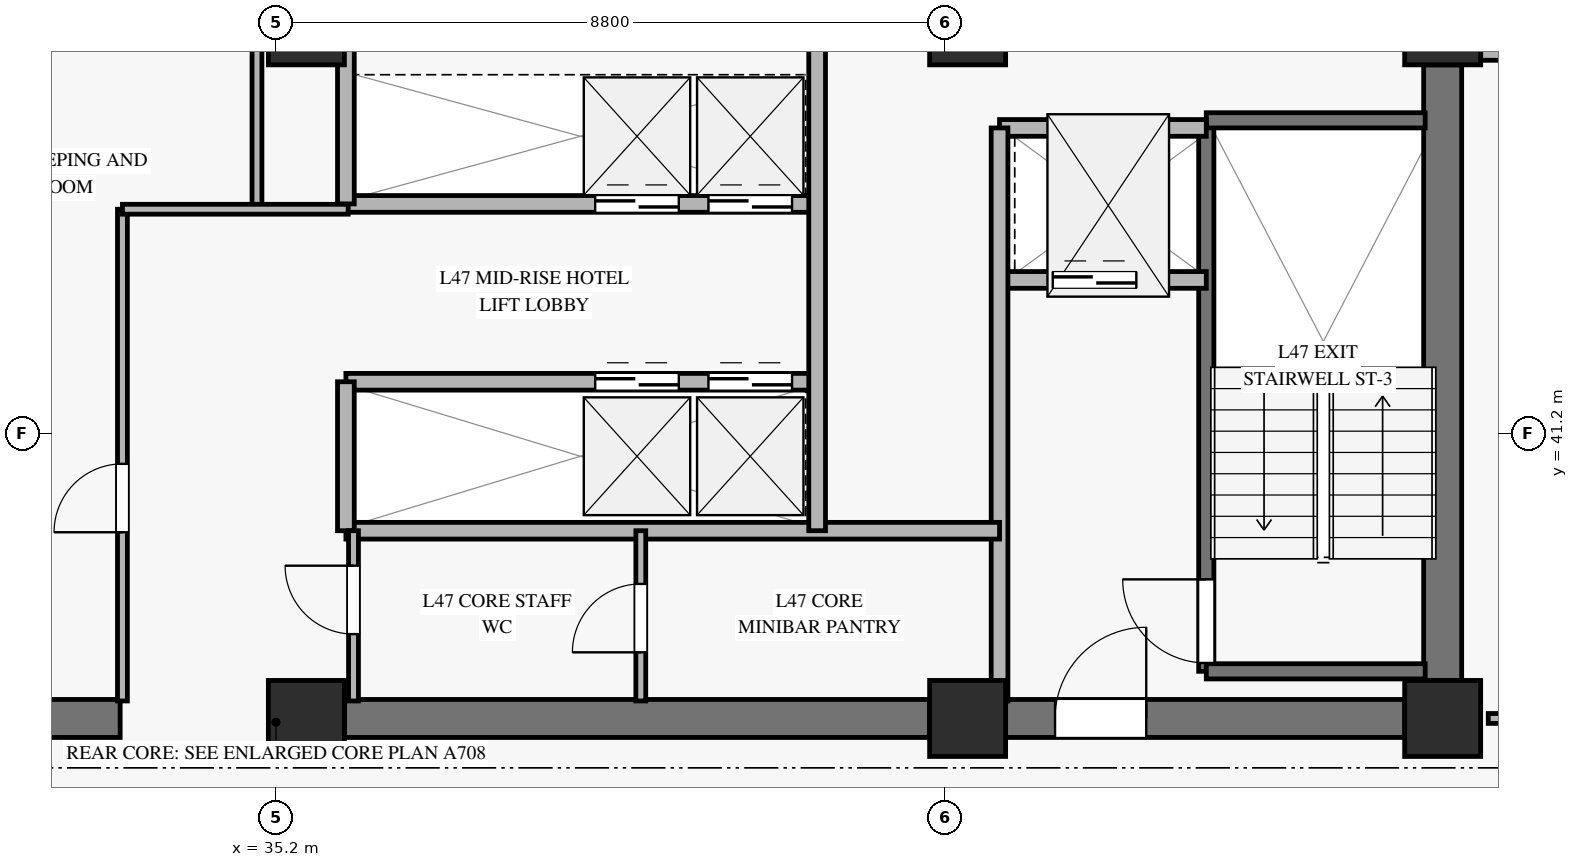
"""IFC4 building model, lengths in metres.
Left out: names, types, materials, properties, quantities, classifications, styles, units other than length and angle.
Written with IfcOpenShell. Run it as: python <this file> out.ifc"""

import sys

from ifc_helpers import new_model, si_unit, direction, frame, frame_2d, origin, origin_2d, place, context, subcontext, project, spatial, rectangle, extrude, source, transform, mapped, element, fill, save


model = new_model("IFC4")
c1 = context("Model", 3, precision=1e-05, world=origin(), true_north=direction((0.0, 1.0)))
c2 = subcontext(c1, "Body", "Model", "MODEL_VIEW")
j1 = project(units=[si_unit("LENGTHUNIT", "METRE"), si_unit("PLANEANGLEUNIT", "RADIAN")], contexts=[c1])
p1 = place(None, origin())
s1 = spatial("IfcSite", under=j1, at=p1, CompositionType="ELEMENT")
p2 = place(p1, origin())
s2 = spatial("IfcBuilding", under=s1, at=p2, CompositionType="ELEMENT")
p3 = place(p2, frame((0.0, 0.0, 187.7)))
s3 = spatial("IfcBuildingStorey", under=s2, at=p3, CompositionType="ELEMENT", Elevation=187.7)
m1 = source(origin(), c2, "Body", "SweptSolid", [
    extrude(rectangle(XDim=1.0, YDim=1.0, at=origin_2d()), origin(), (0.0, 0.0, 1.0), 3.22),
])
for number, where, z_axis, x_axis in (
    (1, (35.6, 37.45, 0.0), (0.0, 0.0, 1.0), (1.0, 0.0, 0.0)),
    (2, (35.6, 46.55, 0.0), (0.0, 0.0, 1.0), (1.0, 0.0, 0.0)),
    (3, (44.3, 37.45, 0.0), (0.0, 0.0, 1.0), (1.0, 0.0, 0.0)),
    (4, (44.3, 46.55, 0.0), (0.0, 0.0, 1.0), (1.0, 0.0, 0.0)),
    (5, (50.55, 37.45, 0.0), (0.0, 0.0, 1.0), (1.0, 0.0, 0.0)),
    (6, (50.55, 46.55, 0.0), (0.0, 0.0, 1.0), (1.0, 0.0, 0.0)),
):
    element("IfcColumn", number, at=place(p3, frame(where, z_axis=z_axis, x_axis=x_axis)), inside=s3, PredefinedType="PILASTER", context=c2, shape_type="MappedRepresentation", body=[
        mapped(m1, transform((0.0, 0.0, 0.0), x_axis=(1.0, 0.0, 0.0), y_axis=(0.0, 1.0, 0.0), z_axis=(0.0, 0.0, 1.0), scale=1.0)),
    ])
p4 = place(p3, frame((31.3, 37.45, 0.0), z_axis=(0.0, 0.0, 1.0), x_axis=(1.0, 0.0, 0.0)))
e7 = element("IfcWall", 7, at=p4, inside=s3, PredefinedType="SHEAR", context=c2, shape_type="SweptSolid", body=[
    extrude(rectangle(XDim=1.85, YDim=0.5, at=frame_2d((0.925, 0.0))), origin(), (0.0, 0.0, 1.0), 3.22),
])
p5 = place(p3, frame((36.1, 37.45, 0.0), z_axis=(0.0, 0.0, 1.0), x_axis=(1.0, 0.0, 0.0)))
e8 = element("IfcWall", 8, at=p5, inside=s3, PredefinedType="SHEAR", context=c2, shape_type="SweptSolid", body=[
    extrude(rectangle(XDim=7.7, YDim=0.5, at=frame_2d((3.85, 0.0))), origin(), (0.0, 0.0, 1.0), 3.22),
])
p6 = place(p3, frame((44.8, 37.45, 0.0), z_axis=(0.0, 0.0, 1.0), x_axis=(1.0, 0.0, 0.0)))
e9 = element("IfcWall", 9, at=p6, inside=s3, PredefinedType="SHEAR", context=c2, shape_type="SweptSolid", body=[
    extrude(rectangle(XDim=5.25, YDim=0.5, at=frame_2d((2.625, 0.0))), origin(), (0.0, 0.0, 1.0), 3.22),
])
p7 = place(p6, frame((0.65, 0.0, 0.0)))
e10 = element("IfcOpeningElement", 10, at=p7, cuts=e9, PredefinedType="OPENING", context=c2, shape_type="SweptSolid", body=[
    extrude(rectangle(XDim=1.2, YDim=2.15, at=frame_2d((0.6, 1.075))), frame((0.0, 0.26, 0.0), z_axis=(0.0, -1.0, 0.0), x_axis=(1.0, 0.0, 0.0)), (0.0, 0.0, 1.0), 0.52),
])
p8 = place(p3, frame((50.55, 37.95, 0.0), z_axis=(0.0, 0.0, 1.0), x_axis=(0.0, 1.0, 0.0)))
e11 = element("IfcWall", 11, at=p8, inside=s3, PredefinedType="SHEAR", context=c2, shape_type="SweptSolid", body=[
    extrude(rectangle(XDim=8.1, YDim=0.5, at=frame_2d((4.05, 0.0))), origin(), (0.0, 0.0, 1.0), 3.22),
])
p9 = place(p3, frame((51.05, 46.25, 0.0), z_axis=(0.0, 0.0, 1.0), x_axis=(1.0, 0.0, 0.0)))
e12 = element("IfcWall", 12, at=p9, inside=s3, PredefinedType="SOLIDWALL", context=c2, shape_type="SweptSolid", body=[
    extrude(rectangle(XDim=9.986, YDim=0.28, at=frame_2d((4.993, 0.0))), origin(), (0.0, 0.0, 1.0), 2.7),
])
p10 = place(p9, frame((4.193, 0.0, 0.45)))
e13 = element("IfcOpeningElement", 13, at=p10, cuts=e12, PredefinedType="OPENING", context=c2, shape_type="SweptSolid", body=[
    extrude(rectangle(XDim=1.6, YDim=2.0, at=frame_2d((0.8, 1.0))), frame((0.0, 0.15, 0.0), z_axis=(0.0, -1.0, 0.0), x_axis=(1.0, 0.0, 0.0)), (0.0, 0.0, 1.0), 0.3),
])
p11 = place(p3, frame((47.44, 38.07, 0.0), z_axis=(0.0, 0.0, 1.0), x_axis=(0.0, 1.0, 0.0)))
e14 = element("IfcWall", 14, at=p11, inside=s3, PredefinedType="SOLIDWALL", context=c2, shape_type="SweptSolid", body=[
    extrude(rectangle(XDim=7.25, YDim=0.2, at=frame_2d((3.625, 0.0))), origin(), (0.0, 0.0, 1.0), 3.5),
])
p12 = place(p11, frame((0.11, 0.0, 0.0)))
e15 = element("IfcOpeningElement", 15, at=p12, cuts=e14, PredefinedType="OPENING", context=c2, shape_type="SweptSolid", body=[
    extrude(rectangle(XDim=1.1, YDim=2.15, at=frame_2d((0.55, 1.075))), frame((0.0, 0.11, 0.0), z_axis=(0.0, -1.0, 0.0), x_axis=(1.0, 0.0, 0.0)), (0.0, 0.0, 1.0), 0.22),
])
for number, where, z_axis, x_axis in (
    (16, (47.44, 45.32, 0.0), (0.0, 0.0, 1.0), (1.0, 0.0, 0.0)),
    (17, (47.44, 38.07, 0.0), (0.0, 0.0, 1.0), (1.0, 0.0, 0.0)),
):
    element("IfcWall", number, at=place(p3, frame(where, z_axis=z_axis, x_axis=x_axis)), inside=s3, PredefinedType="SOLIDWALL", context=c2, shape_type="SweptSolid", body=[
        extrude(rectangle(XDim=2.88, YDim=0.2, at=frame_2d((1.44, 0.0))), origin(), (0.0, 0.0, 1.0), 3.5),
    ])
p13 = place(p3, frame((44.72, 43.22, 0.0), z_axis=(0.0, 0.0, 1.0), x_axis=(1.0, 0.0, 0.0)))
e18 = element("IfcWall", 18, at=p13, inside=s3, PredefinedType="SOLIDWALL", context=c2, shape_type="SweptSolid", body=[
    extrude(rectangle(XDim=2.72, YDim=0.22, at=frame_2d((1.36, 0.0))), origin(), (0.0, 0.0, 1.0), 3.22),
])
p14 = place(p13, frame((0.7, 0.0, 0.0)))
e19 = element("IfcOpeningElement", 19, at=p14, cuts=e18, PredefinedType="OPENING", context=c2, shape_type="SweptSolid", body=[
    extrude(rectangle(XDim=1.1, YDim=2.2, at=frame_2d((0.55, 1.1))), frame((0.0, 0.12, 0.0), z_axis=(0.0, -1.0, 0.0), x_axis=(1.0, 0.0, 0.0)), (0.0, 0.0, 1.0), 0.24),
])
p15 = place(p3, frame((44.72, 45.22, 0.0), z_axis=(0.0, 0.0, 1.0), x_axis=(1.0, 0.0, 0.0)))
e20 = element("IfcWall", 20, at=p15, inside=s3, PredefinedType="SOLIDWALL", context=c2, shape_type="SweptSolid", body=[
    extrude(rectangle(XDim=2.72, YDim=0.22, at=frame_2d((1.36, 0.0))), origin(), (0.0, 0.0, 1.0), 3.22),
])
p16 = place(p3, frame((44.72, 37.68, 0.0), z_axis=(0.0, 0.0, 1.0), x_axis=(0.0, 1.0, 0.0)))
e21 = element("IfcWall", 21, at=p16, inside=s3, PredefinedType="SOLIDWALL", context=c2, shape_type="SweptSolid", body=[
    extrude(rectangle(XDim=7.54, YDim=0.22, at=frame_2d((3.77, 0.0))), origin(), (0.0, 0.0, 1.0), 3.22),
])
p17 = place(p3, frame((36.12, 44.22, 0.0), z_axis=(0.0, 0.0, 1.0), x_axis=(1.0, 0.0, 0.0)))
e22 = element("IfcWall", 22, at=p17, inside=s3, PredefinedType="SOLIDWALL", context=c2, shape_type="SweptSolid", body=[
    extrude(rectangle(XDim=6.2, YDim=0.22, at=frame_2d((3.1, 0.0))), origin(), (0.0, 0.0, 1.0), 3.22),
])
p18 = place(p17, frame((3.28, 0.0, 0.0)))
e23 = element("IfcOpeningElement", 23, at=p18, cuts=e22, PredefinedType="OPENING", context=c2, shape_type="SweptSolid", body=[
    extrude(rectangle(XDim=1.1, YDim=2.2, at=frame_2d((0.55, 1.1))), frame((0.0, 0.12, 0.0), z_axis=(0.0, -1.0, 0.0), x_axis=(1.0, 0.0, 0.0)), (0.0, 0.0, 1.0), 0.24),
])
p19 = place(p17, frame((4.77, 0.0, 0.0)))
e24 = element("IfcOpeningElement", 24, at=p19, cuts=e22, PredefinedType="OPENING", context=c2, shape_type="SweptSolid", body=[
    extrude(rectangle(XDim=1.1, YDim=2.2, at=frame_2d((0.55, 1.1))), frame((0.0, 0.12, 0.0), z_axis=(0.0, -1.0, 0.0), x_axis=(1.0, 0.0, 0.0)), (0.0, 0.0, 1.0), 0.24),
])
p20 = place(p3, frame((36.12, 41.88, 0.0), z_axis=(0.0, 0.0, 1.0), x_axis=(1.0, 0.0, 0.0)))
e25 = element("IfcWall", 25, at=p20, inside=s3, PredefinedType="SOLIDWALL", context=c2, shape_type="SweptSolid", body=[
    extrude(rectangle(XDim=6.2, YDim=0.22, at=frame_2d((3.1, 0.0))), origin(), (0.0, 0.0, 1.0), 3.22),
])
p21 = place(p20, frame((3.28, 0.0, 0.0)))
e26 = element("IfcOpeningElement", 26, at=p21, cuts=e25, PredefinedType="OPENING", context=c2, shape_type="SweptSolid", body=[
    extrude(rectangle(XDim=1.1, YDim=2.2, at=frame_2d((0.55, 1.1))), frame((0.0, 0.12, 0.0), z_axis=(0.0, -1.0, 0.0), x_axis=(1.0, 0.0, 0.0)), (0.0, 0.0, 1.0), 0.24),
])
p22 = place(p20, frame((4.77, 0.0, 0.0)))
e27 = element("IfcOpeningElement", 27, at=p22, cuts=e25, PredefinedType="OPENING", context=c2, shape_type="SweptSolid", body=[
    extrude(rectangle(XDim=1.1, YDim=2.2, at=frame_2d((0.55, 1.1))), frame((0.0, 0.12, 0.0), z_axis=(0.0, -1.0, 0.0), x_axis=(1.0, 0.0, 0.0)), (0.0, 0.0, 1.0), 0.24),
])
p23 = place(p3, frame((36.12, 39.92, 0.0), z_axis=(0.0, 0.0, 1.0), x_axis=(1.0, 0.0, 0.0)))
e28 = element("IfcWall", 28, at=p23, inside=s3, PredefinedType="SOLIDWALL", context=c2, shape_type="SweptSolid", body=[
    extrude(rectangle(XDim=8.6, YDim=0.22, at=frame_2d((4.3, 0.0))), origin(), (0.0, 0.0, 1.0), 2.505),
])
p24 = place(p3, frame((42.32, 39.92, 0.0), z_axis=(0.0, 0.0, 1.0), x_axis=(0.0, 1.0, 0.0)))
e29 = element("IfcWall", 29, at=p24, inside=s3, PredefinedType="SOLIDWALL", context=c2, shape_type="SweptSolid", body=[
    extrude(rectangle(XDim=6.4, YDim=0.22, at=frame_2d((3.2, 0.0))), origin(), (0.0, 0.0, 1.0), 3.22),
])
p25 = place(p3, frame((36.12, 39.92, 0.0), z_axis=(0.0, 0.0, 1.0), x_axis=(0.0, 1.0, 0.0)))
e30 = element("IfcWall", 30, at=p25, inside=s3, PredefinedType="SOLIDWALL", context=c2, shape_type="SweptSolid", body=[
    extrude(rectangle(XDim=1.96, YDim=0.22, at=frame_2d((0.98, 0.0))), origin(), (0.0, 0.0, 1.0), 3.22),
])
p26 = place(p3, frame((36.12, 44.22, 0.0), z_axis=(0.0, 0.0, 1.0), x_axis=(0.0, 1.0, 0.0)))
e31 = element("IfcWall", 31, at=p26, inside=s3, PredefinedType="SOLIDWALL", context=c2, shape_type="SweptSolid", body=[
    extrude(rectangle(XDim=2.1, YDim=0.22, at=frame_2d((1.05, 0.0))), origin(), (0.0, 0.0, 1.0), 3.22),
])
p27 = place(p3, frame((33.18, 37.68, 0.0), z_axis=(0.0, 0.0, 1.0), x_axis=(0.0, 1.0, 0.0)))
e32 = element("IfcWall", 32, at=p27, inside=s3, PredefinedType="PARTITIONING", context=c2, shape_type="SweptSolid", body=[
    extrude(rectangle(XDim=6.47, YDim=0.13, at=frame_2d((3.235, 0.0))), origin(), (0.0, 0.0, 1.0), 2.305),
])
p28 = place(p27, frame((2.22, 0.0, 0.0)))
e33 = element("IfcOpeningElement", 33, at=p28, cuts=e32, PredefinedType="OPENING", context=c2, shape_type="SweptSolid", body=[
    extrude(rectangle(XDim=0.9, YDim=2.1, at=frame_2d((0.45, 1.05))), frame((0.0, 0.075, 0.0), z_axis=(0.0, -1.0, 0.0), x_axis=(1.0, 0.0, 0.0)), (0.0, 0.0, 1.0), 0.15),
])
p29 = place(p3, frame((34.95, 44.15, 0.0), z_axis=(0.0, 0.0, 1.0), x_axis=(0.0, 1.0, 0.0)))
e34 = element("IfcWall", 34, at=p29, inside=s3, PredefinedType="PARTITIONING", context=c2, shape_type="SweptSolid", body=[
    extrude(rectangle(XDim=2.17, YDim=0.13, at=frame_2d((1.085, 0.0))), origin(), (0.0, 0.0, 1.0), 3.22),
])
p30 = place(p3, frame((33.18, 44.15, 0.0), z_axis=(0.0, 0.0, 1.0), x_axis=(1.0, 0.0, 0.0)))
e35 = element("IfcWall", 35, at=p30, inside=s3, PredefinedType="PARTITIONING", context=c2, shape_type="SweptSolid", body=[
    extrude(rectangle(XDim=2.97, YDim=0.13, at=frame_2d((1.485, 0.0))), origin(), (0.0, 0.0, 1.0), 2.505),
])
p31 = place(p3, frame((36.22, 37.68, 0.0), z_axis=(0.0, 0.0, 1.0), x_axis=(0.0, 1.0, 0.0)))
e36 = element("IfcWall", 36, at=p31, inside=s3, PredefinedType="PARTITIONING", context=c2, shape_type="SweptSolid", body=[
    extrude(rectangle(XDim=2.24, YDim=0.13, at=frame_2d((1.12, 0.0))), origin(), (0.0, 0.0, 1.0), 3.22),
])
p32 = place(p31, frame((0.88, 0.0, 0.0)))
e37 = element("IfcOpeningElement", 37, at=p32, cuts=e36, PredefinedType="OPENING", context=c2, shape_type="SweptSolid", body=[
    extrude(rectangle(XDim=0.9, YDim=2.1, at=frame_2d((0.45, 1.05))), frame((0.0, 0.075, 0.0), z_axis=(0.0, -1.0, 0.0), x_axis=(1.0, 0.0, 0.0)), (0.0, 0.0, 1.0), 0.15),
])
p33 = place(p3, frame((40.0, 37.68, 0.0), z_axis=(0.0, 0.0, 1.0), x_axis=(0.0, 1.0, 0.0)))
e38 = element("IfcWall", 38, at=p33, inside=s3, PredefinedType="PARTITIONING", context=c2, shape_type="SweptSolid", body=[
    extrude(rectangle(XDim=2.24, YDim=0.13, at=frame_2d((1.12, 0.0))), origin(), (0.0, 0.0, 1.0), 3.22),
])
p34 = place(p33, frame((0.64, 0.0, 0.0)))
e39 = element("IfcOpeningElement", 39, at=p34, cuts=e38, PredefinedType="OPENING", context=c2, shape_type="SweptSolid", body=[
    extrude(rectangle(XDim=0.9, YDim=2.1, at=frame_2d((0.45, 1.05))), frame((0.0, 0.075, 0.0), z_axis=(0.0, -1.0, 0.0), x_axis=(1.0, 0.0, 0.0)), (0.0, 0.0, 1.0), 0.15),
])
p35 = place(p3, frame((51.15, 37.45, 0.0), z_axis=(0.0, 0.0, 1.0), x_axis=(1.0, 0.0, 0.0)))
e40 = element("IfcWall", 40, at=p35, inside=s3, PredefinedType="PARTITIONING", context=c2, shape_type="SweptSolid", body=[
    extrude(rectangle(XDim=13.097, YDim=0.13, at=frame_2d((6.549, 0.0))), origin(), (0.0, 0.0, 1.0), 2.705),
])
p36 = place(p35, frame((0.5, 0.0, 0.0)))
e41 = element("IfcOpeningElement", 41, at=p36, cuts=e40, PredefinedType="OPENING", context=c2, shape_type="SweptSolid", body=[
    extrude(rectangle(XDim=0.9, YDim=2.1, at=frame_2d((0.45, 1.05))), frame((0.0, 0.075, 0.0), z_axis=(0.0, -1.0, 0.0), x_axis=(1.0, 0.0, 0.0)), (0.0, 0.0, 1.0), 0.15),
])
p37 = place(p35, frame((9.443, 0.0, 0.0)))
e42 = element("IfcOpeningElement", 42, at=p37, cuts=e40, PredefinedType="OPENING", context=c2, shape_type="SweptSolid", body=[
    extrude(rectangle(XDim=0.95, YDim=2.1, at=frame_2d((0.475, 1.05))), frame((0.0, 0.075, 0.0), z_axis=(0.0, -1.0, 0.0), x_axis=(1.0, 0.0, 0.0)), (0.0, 0.0, 1.0), 0.15),
])
m2 = source(origin(), c2, "Body", "SweptSolid", [
    extrude(rectangle(XDim=1.1, YDim=2.15, at=frame_2d((0.55, 1.075))), frame((0.0, 0.025, 0.0), z_axis=(0.0, -1.0, 0.0), x_axis=(1.0, 0.0, 0.0)), (0.0, 0.0, 1.0), 0.05),
])
p38 = place(p12, origin())
e43 = element("IfcDoor", 43, at=p38, inside=s3, OperationType="SINGLE_SWING_RIGHT", PredefinedType="DOOR", context=c2, shape_type="MappedRepresentation", body=[
    mapped(m2, transform((0.0, 0.0, 0.0), x_axis=(1.0, 0.0, 0.0), y_axis=(0.0, 1.0, 0.0), z_axis=(0.0, 0.0, 1.0), scale=1.0)),
])
fill(e15, e43)
m3 = source(origin(), c2, "Body", "SweptSolid", [
    extrude(rectangle(XDim=1.1, YDim=2.2, at=frame_2d((0.55, 1.1))), frame((0.0, 0.025, 0.0), z_axis=(0.0, -1.0, 0.0), x_axis=(1.0, 0.0, 0.0)), (0.0, 0.0, 1.0), 0.05),
])
p39 = place(p14, origin())
e44 = element("IfcDoor", 44, at=p39, inside=s3, OperationType="SLIDING_TO_LEFT", PredefinedType="DOOR", context=c2, shape_type="MappedRepresentation", body=[
    mapped(m3, transform((0.0, 0.0, 0.0), x_axis=(1.0, 0.0, 0.0), y_axis=(0.0, 1.0, 0.0), z_axis=(0.0, 0.0, 1.0), scale=1.0)),
])
fill(e19, e44)
m4 = source(origin(), c2, "Body", "SweptSolid", [
    extrude(rectangle(XDim=1.2, YDim=2.15, at=frame_2d((0.6, 1.075))), frame((0.0, 0.025, 0.0), z_axis=(0.0, -1.0, 0.0), x_axis=(1.0, 0.0, 0.0)), (0.0, 0.0, 1.0), 0.05),
])
p40 = place(p7, origin())
e45 = element("IfcDoor", 45, at=p40, inside=s3, OperationType="SINGLE_SWING_RIGHT", PredefinedType="DOOR", context=c2, shape_type="MappedRepresentation", body=[
    mapped(m4, transform((0.0, 0.0, 0.0), x_axis=(1.0, 0.0, 0.0), y_axis=(0.0, 1.0, 0.0), z_axis=(0.0, 0.0, 1.0), scale=1.0)),
])
fill(e10, e45)
p41 = place(p18, origin())
e46 = element("IfcDoor", 46, at=p41, inside=s3, OperationType="SLIDING_TO_LEFT", PredefinedType="DOOR", context=c2, shape_type="MappedRepresentation", body=[
    mapped(m3, transform((0.0, 0.0, 0.0), x_axis=(1.0, 0.0, 0.0), y_axis=(0.0, 1.0, 0.0), z_axis=(0.0, 0.0, 1.0), scale=1.0)),
])
fill(e23, e46)
p42 = place(p19, origin())
e47 = element("IfcDoor", 47, at=p42, inside=s3, OperationType="SLIDING_TO_LEFT", PredefinedType="DOOR", context=c2, shape_type="MappedRepresentation", body=[
    mapped(m3, transform((0.0, 0.0, 0.0), x_axis=(1.0, 0.0, 0.0), y_axis=(0.0, 1.0, 0.0), z_axis=(0.0, 0.0, 1.0), scale=1.0)),
])
fill(e24, e47)
p43 = place(p21, origin())
e48 = element("IfcDoor", 48, at=p43, inside=s3, OperationType="SLIDING_TO_LEFT", PredefinedType="DOOR", context=c2, shape_type="MappedRepresentation", body=[
    mapped(m3, transform((0.0, 0.0, 0.0), x_axis=(1.0, 0.0, 0.0), y_axis=(0.0, 1.0, 0.0), z_axis=(0.0, 0.0, 1.0), scale=1.0)),
])
fill(e26, e48)
p44 = place(p22, origin())
e49 = element("IfcDoor", 49, at=p44, inside=s3, OperationType="SLIDING_TO_LEFT", PredefinedType="DOOR", context=c2, shape_type="MappedRepresentation", body=[
    mapped(m3, transform((0.0, 0.0, 0.0), x_axis=(1.0, 0.0, 0.0), y_axis=(0.0, 1.0, 0.0), z_axis=(0.0, 0.0, 1.0), scale=1.0)),
])
fill(e27, e49)
m5 = source(origin(), c2, "Body", "SweptSolid", [
    extrude(rectangle(XDim=0.9, YDim=2.1, at=frame_2d((0.45, 1.05))), frame((0.0, 0.025, 0.0), z_axis=(0.0, -1.0, 0.0), x_axis=(1.0, 0.0, 0.0)), (0.0, 0.0, 1.0), 0.05),
])
p45 = place(p28, origin())
e50 = element("IfcDoor", 50, at=p45, inside=s3, OperationType="SINGLE_SWING_LEFT", PredefinedType="DOOR", context=c2, shape_type="MappedRepresentation", body=[
    mapped(m5, transform((0.0, 0.0, 0.0), x_axis=(1.0, 0.0, 0.0), y_axis=(0.0, 1.0, 0.0), z_axis=(0.0, 0.0, 1.0), scale=1.0)),
])
fill(e33, e50)
p46 = place(p32, origin())
e51 = element("IfcDoor", 51, at=p46, inside=s3, OperationType="SINGLE_SWING_RIGHT", PredefinedType="DOOR", context=c2, shape_type="MappedRepresentation", body=[
    mapped(m5, transform((0.0, 0.0, 0.0), x_axis=(1.0, 0.0, 0.0), y_axis=(0.0, 1.0, 0.0), z_axis=(0.0, 0.0, 1.0), scale=1.0)),
])
fill(e37, e51)
p47 = place(p34, origin())
e52 = element("IfcDoor", 52, at=p47, inside=s3, OperationType="SINGLE_SWING_LEFT", PredefinedType="DOOR", context=c2, shape_type="MappedRepresentation", body=[
    mapped(m5, transform((0.0, 0.0, 0.0), x_axis=(1.0, 0.0, 0.0), y_axis=(0.0, 1.0, 0.0), z_axis=(0.0, 0.0, 1.0), scale=1.0)),
])
fill(e39, e52)
save(model, sys.argv[1])
